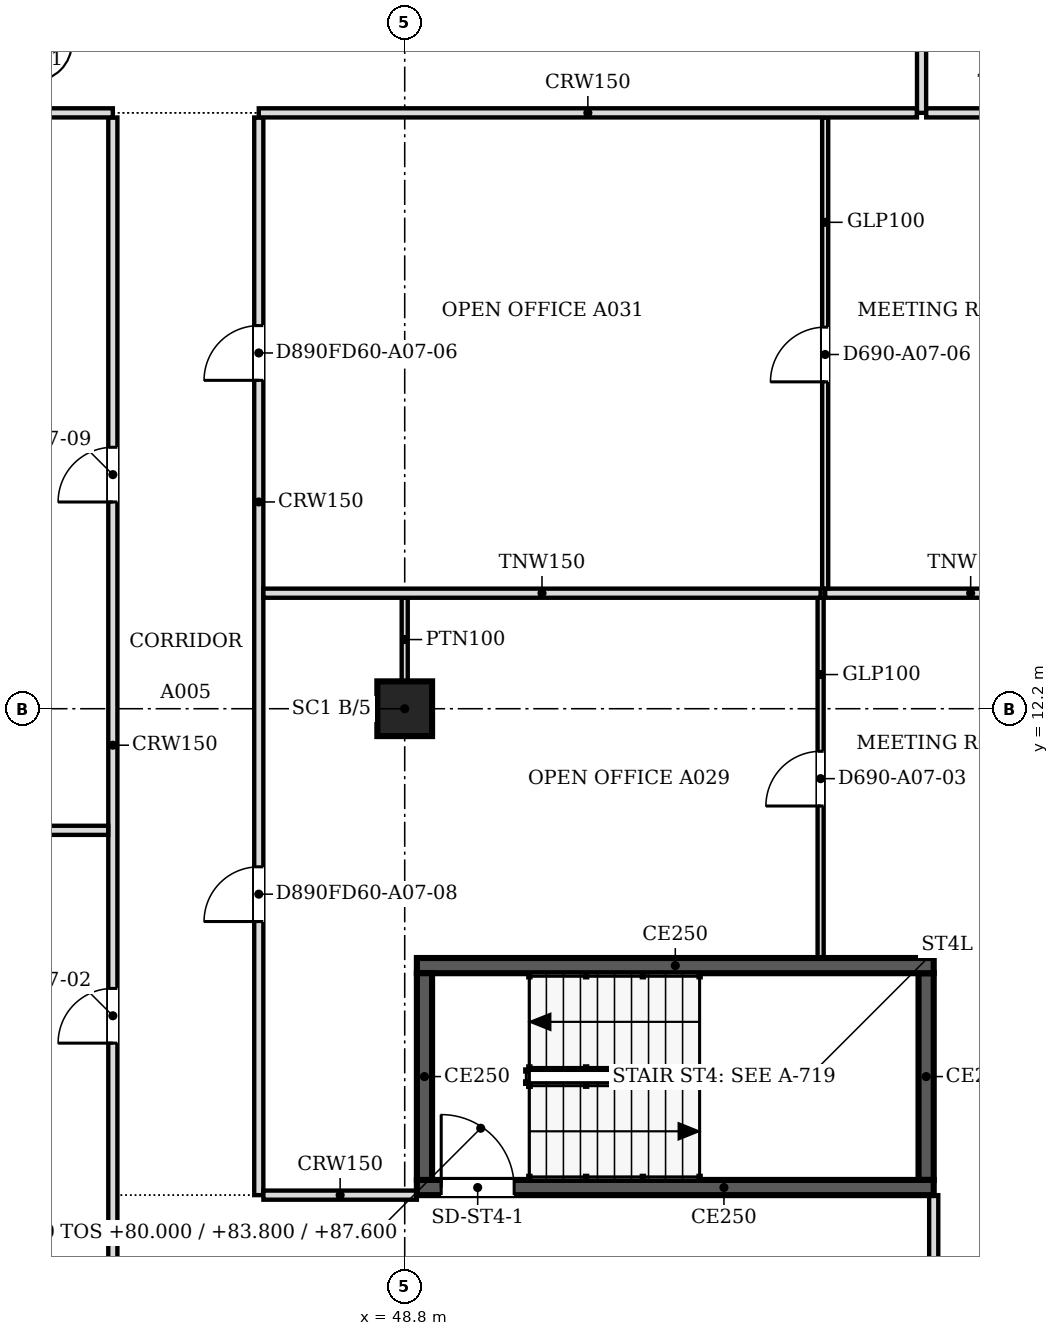
"""IFC4 building model, lengths in metres.
Left out: names, types, materials, properties, quantities, classifications, styles, units other than length and angle.
Written with IfcOpenShell. Run it as: python <this file> out.ifc"""

import sys

from ifc_helpers import new_model, si_unit, direction, frame, frame_2d, origin, origin_2d, place, context, subcontext, project, spatial, polyline, rectangle, outline, extrude, faceted_brep, source, transform, mapped, element, fill, save


model = new_model("IFC4")
c1 = context("Model", 3, precision=1e-05, world=origin(), true_north=direction((0.0, 1.0)))
c2 = subcontext(c1, "Body", "Model", "MODEL_VIEW")
j1 = project(units=[si_unit("LENGTHUNIT", "METRE"), si_unit("PLANEANGLEUNIT", "RADIAN")], contexts=[c1])
p1 = place(None, origin())
s1 = spatial("IfcSite", under=j1, at=p1, CompositionType="ELEMENT")
p2 = place(p1, origin())
s2 = spatial("IfcBuilding", under=s1, at=p2, CompositionType="ELEMENT")
p3 = place(p2, frame((0.0, 0.0, 80.0)))
s3 = spatial("IfcBuildingStorey", under=s2, at=p3, CompositionType="ELEMENT", Elevation=80.0)
p4 = place(p3, frame((48.8, 12.2, 0.0), z_axis=(0.0, 0.0, 1.0), x_axis=(1.0, 0.0, 0.0)))
e1 = element("IfcColumn", 1, at=p4, inside=s3, PredefinedType="COLUMN", context=c2, shape_type="SweptSolid", body=[
    extrude(rectangle(XDim=0.9, YDim=0.9, at=origin_2d()), origin(), (0.0, 0.0, 1.0), 3.6),
])
m1 = source(origin(), c2, "Body", "Brep", [
    faceted_brep([(0.053, -0.25, 0.0), (2.997, -0.25, 3.8), (0.053, -0.25, 7.6), (0.0, -0.25, 7.532), (0.0, -0.25, 0.068), (0.106, 0.25, 7.532), (2.944, 0.25, 3.868), (2.944, 0.25, 3.732), (0.106, 0.25, 0.068), (2.997, 0.0, 3.8), (0.053, 0.0, 0.0), (0.053, 0.0, 7.6)], [[[0, 1, 2, 3, 4]], [[5, 6, 7, 8]], [[8, 7, 9, 1, 0, 10]], [[6, 5, 11, 2, 1, 9]], [[3, 2, 11]], [[10, 0, 4]], [[8, 10, 4, 3, 11, 5]], [[9, 7, 6]]]),
])
p5 = place(p3, frame((57.569, 1.274, -3.8), z_axis=(0.0, 0.0, 1.0), x_axis=(0.707066050402, 0.707147509625, 0.0)))
e2 = element("IfcWall", 2, at=p5, inside=s3, PredefinedType="SOLIDWALL", context=c2, shape_type="MappedRepresentation", body=[
    mapped(m1, transform((0.0, 0.0, 0.0), scale=1.0)),
])
m2 = source(origin(), c2, "Body", "SweptSolid", [
    extrude(outline(polyline([(0.253, 0.666), (2.681, 3.8), (0.253, 6.934), (0.253, 0.666)])), frame((0.0, 0.26, 0.0), z_axis=(0.0, -1.0, 0.0), x_axis=(1.0, 0.0, 0.0)), (0.0, 0.0, 1.0), 0.52),
])
p6 = place(p5, origin())
e3 = element("IfcOpeningElement", 3, at=p6, cuts=e2, PredefinedType="OPENING", context=c2, shape_type="MappedRepresentation", body=[
    mapped(m2, transform((0.0, 0.0, 0.0), scale=1.0)),
])
p7 = place(p2, frame((0.0, 0.0, 83.8)))
s4 = spatial("IfcBuildingStorey", under=s2, at=p7, CompositionType="ELEMENT", Elevation=83.8)
m3 = source(origin(), c2, "Body", "Brep", [
    faceted_brep([(2.944, -0.25, 0.0), (2.997, -0.25, 0.068), (2.997, -0.25, 7.532), (2.944, -0.25, 7.6), (0.0, -0.25, 3.8), (0.053, 0.25, 3.868), (2.891, 0.25, 7.532), (2.891, 0.25, 0.068), (0.053, 0.25, 3.732), (2.944, 0.0, 0.0), (2.944, 0.0, 7.6), (0.0, 0.0, 3.8)], [[[0, 1, 2, 3, 4]], [[5, 6, 7, 8]], [[1, 0, 9]], [[10, 3, 2]], [[6, 5, 11, 4, 3, 10]], [[8, 7, 9, 0, 4, 11]], [[8, 11, 5]], [[1, 9, 7, 6, 10, 2]]]),
])
p8 = place(p7, frame((57.606, 1.312, -3.8), z_axis=(0.0, 0.0, 1.0), x_axis=(0.707147509625, 0.707066050402, 0.0)))
e4 = element("IfcWall", 4, at=p8, inside=s4, PredefinedType="SOLIDWALL", context=c2, shape_type="MappedRepresentation", body=[
    mapped(m3, transform((0.0, 0.0, 0.0), scale=1.0)),
])
m4 = source(origin(), c2, "Body", "SweptSolid", [
    extrude(outline(polyline([(2.744, 6.934), (0.316, 3.8), (2.744, 0.666), (2.744, 6.934)])), frame((0.0, 0.26, 0.0), z_axis=(0.0, -1.0, 0.0), x_axis=(1.0, 0.0, 0.0)), (0.0, 0.0, 1.0), 0.52),
])
p9 = place(p8, origin())
e5 = element("IfcOpeningElement", 5, at=p9, cuts=e4, PredefinedType="OPENING", context=c2, shape_type="MappedRepresentation", body=[
    mapped(m4, transform((0.0, 0.0, 0.0), scale=1.0)),
])
p10 = place(p3, frame((57.5, 4.325, 0.0), z_axis=(0.0, 0.0, 1.0), x_axis=(-1.0, 0.0, 0.0)))
e6 = element("IfcWall", 6, at=p10, inside=s3, PredefinedType="SOLIDWALL", context=c2, shape_type="SweptSolid", body=[
    extrude(rectangle(XDim=8.5, YDim=0.25, at=frame_2d((4.25, 0.0))), origin(), (0.0, 0.0, 1.0), 3.8),
])
m5 = source(origin(), c2, "Body", "SweptSolid", [
    extrude(rectangle(XDim=1.2, YDim=2.1, at=frame_2d((0.6, 1.05))), frame((0.0, 0.135, 0.0), z_axis=(0.0, -1.0, 0.0), x_axis=(1.0, 0.0, 0.0)), (0.0, 0.0, 1.0), 0.27),
])
p11 = place(p10, frame((6.9, 0.0, 0.0)))
e7 = element("IfcOpeningElement", 7, at=p11, cuts=e6, PredefinedType="OPENING", context=c2, shape_type="MappedRepresentation", body=[
    mapped(m5, transform((0.0, 0.0, 0.0), scale=1.0)),
])
p12 = place(p3, frame((49.125, 4.45, 0.0), z_axis=(0.0, 0.0, 1.0), x_axis=(0.0, 1.0, 0.0)))
e8 = element("IfcWall", 8, at=p12, inside=s3, PredefinedType="SOLIDWALL", context=c2, shape_type="SweptSolid", body=[
    extrude(rectangle(XDim=3.4, YDim=0.25, at=frame_2d((1.7, 0.0))), origin(), (0.0, 0.0, 1.0), 3.8),
])
p13 = place(p3, frame((49.0, 7.975, 0.0), z_axis=(0.0, 0.0, 1.0), x_axis=(1.0, 0.0, 0.0)))
e9 = element("IfcWall", 9, at=p13, inside=s3, PredefinedType="SOLIDWALL", context=c2, shape_type="SweptSolid", body=[
    extrude(rectangle(XDim=8.5, YDim=0.25, at=frame_2d((4.25, 0.0))), origin(), (0.0, 0.0, 1.0), 3.8),
])
p14 = place(p3, frame((57.375, 7.85, 0.0), z_axis=(0.0, 0.0, 1.0), x_axis=(0.0, -1.0, 0.0)))
e10 = element("IfcWall", 10, at=p14, inside=s3, PredefinedType="SOLIDWALL", context=c2, shape_type="SweptSolid", body=[
    extrude(rectangle(XDim=3.4, YDim=0.25, at=frame_2d((1.7, 0.0))), origin(), (0.0, 0.0, 1.0), 3.8),
])
p15 = place(p3, frame((44.0, 0.5, 0.0), z_axis=(0.0, 0.0, 1.0), x_axis=(0.0, 1.0, 0.0)))
e11 = element("IfcWall", 11, at=p15, inside=s3, PredefinedType="PARTITIONING", context=c2, shape_type="SweptSolid", body=[
    extrude(rectangle(XDim=21.424, YDim=0.15, at=frame_2d((10.712, 0.0))), origin(), (0.0, 0.0, 1.0), 3.067),
])
m6 = source(origin(), c2, "Body", "SweptSolid", [
    extrude(rectangle(XDim=0.9, YDim=2.1, at=frame_2d((0.45, 1.05))), frame((0.0, 0.085, 0.0), z_axis=(0.0, -1.0, 0.0), x_axis=(1.0, 0.0, 0.0)), (0.0, 0.0, 1.0), 0.17),
])
p16 = place(p15, frame((6.2, 0.0, 0.0)))
e12 = element("IfcOpeningElement", 12, at=p16, cuts=e11, PredefinedType="OPENING", context=c2, shape_type="MappedRepresentation", body=[
    mapped(m6, transform((0.0, 0.0, 0.0), scale=1.0)),
])
p17 = place(p15, frame((15.1, 0.0, 0.0)))
e13 = element("IfcOpeningElement", 13, at=p17, cuts=e11, PredefinedType="OPENING", context=c2, shape_type="MappedRepresentation", body=[
    mapped(m6, transform((0.0, 0.0, 0.0), scale=1.0)),
])
p18 = place(p3, frame((57.5, 1.559, 0.0), z_axis=(0.0, 0.0, 1.0), x_axis=(0.0, 1.0, 0.0)))
e14 = element("IfcWall", 14, at=p18, inside=s3, PredefinedType="PARTITIONING", context=c2, shape_type="SweptSolid", body=[
    extrude(rectangle(XDim=2.641, YDim=0.15, at=frame_2d((1.32, 0.0))), origin(), (0.0, 0.0, 1.0), 3.067),
])
p19 = place(p3, frame((46.4, 21.924, 0.0), z_axis=(0.0, 0.0, 1.0), x_axis=(0.0, -1.0, 0.0)))
e15 = element("IfcWall", 15, at=p19, inside=s3, PredefinedType="PARTITIONING", context=c2, shape_type="SweptSolid", body=[
    extrude(rectangle(XDim=17.724, YDim=0.15, at=frame_2d((8.862, 0.0))), origin(), (0.0, 0.0, 1.0), 3.067),
])
p20 = place(p19, frame((3.423, 0.0, 0.0)))
e16 = element("IfcOpeningElement", 16, at=p20, cuts=e15, PredefinedType="OPENING", context=c2, shape_type="MappedRepresentation", body=[
    mapped(m6, transform((0.0, 0.0, 0.0), scale=1.0)),
])
p21 = place(p19, frame((12.324, 0.0, 0.0)))
e17 = element("IfcOpeningElement", 17, at=p21, cuts=e15, PredefinedType="OPENING", context=c2, shape_type="MappedRepresentation", body=[
    mapped(m6, transform((0.0, 0.0, 0.0), scale=1.0)),
])
p22 = place(p3, frame((46.476, 4.2, 0.0), z_axis=(0.0, 0.0, 1.0), x_axis=(1.0, 0.0, 0.0)))
e18 = element("IfcWall", 18, at=p22, inside=s3, PredefinedType="PARTITIONING", context=c2, shape_type="SweptSolid", body=[
    extrude(rectangle(XDim=2.524, YDim=0.15, at=frame_2d((1.262, 0.0))), origin(), (0.0, 0.0, 1.0), 3.067),
])
p23 = place(p3, frame((55.64, 14.024, 0.0), z_axis=(0.0, 0.0, 1.0), x_axis=(0.0, -1.0, 0.0)))
e19 = element("IfcWall", 19, at=p23, inside=s3, PredefinedType="PARTITIONING", context=c2, shape_type="SweptSolid", body=[
    extrude(rectangle(XDim=5.924, YDim=0.1, at=frame_2d((2.962, 0.0))), origin(), (0.0, 0.0, 1.0), 3.067),
])
m7 = source(origin(), c2, "Body", "SweptSolid", [
    extrude(rectangle(XDim=0.9, YDim=2.1, at=frame_2d((0.45, 1.05))), frame((0.0, 0.06, 0.0), z_axis=(0.0, -1.0, 0.0), x_axis=(1.0, 0.0, 0.0)), (0.0, 0.0, 1.0), 0.12),
])
p24 = place(p23, frame((2.524, 0.0, 0.0)))
e20 = element("IfcOpeningElement", 20, at=p24, cuts=e19, PredefinedType="OPENING", context=c2, shape_type="MappedRepresentation", body=[
    mapped(m7, transform((0.0, 0.0, 0.0), scale=1.0)),
])
p25 = place(p3, frame((27.575, 10.2, 0.0), z_axis=(0.0, 0.0, 1.0), x_axis=(1.0, 0.0, 0.0)))
e21 = element("IfcWall", 21, at=p25, inside=s3, PredefinedType="PARTITIONING", context=c2, shape_type="SweptSolid", body=[
    extrude(rectangle(XDim=16.349, YDim=0.15, at=frame_2d((8.175, 0.0))), origin(), (0.0, 0.0, 1.0), 3.067),
])
p26 = place(p3, frame((48.8, 12.65, 0.0), z_axis=(0.0, 0.0, 1.0), x_axis=(0.0, 1.0, 0.0)))
e22 = element("IfcWall", 22, at=p26, inside=s3, PredefinedType="PARTITIONING", context=c2, shape_type="SweptSolid", body=[
    extrude(rectangle(XDim=1.375, YDim=0.1, at=frame_2d((0.688, 0.0))), origin(), (0.0, 0.0, 1.0), 3.067),
])
p27 = place(p3, frame((46.476, 14.1, 0.0), z_axis=(0.0, 0.0, 1.0), x_axis=(1.0, 0.0, 0.0)))
e23 = element("IfcWall", 23, at=p27, inside=s3, PredefinedType="PARTITIONING", context=c2, shape_type="SweptSolid", body=[
    extrude(rectangle(XDim=9.164, YDim=0.15, at=frame_2d((4.582, 0.0))), origin(), (0.0, 0.0, 1.0), 3.067),
])
p28 = place(p3, frame((55.715, 14.1, 0.0), z_axis=(0.0, 0.0, 1.0), x_axis=(1.0, 0.0, 0.0)))
e24 = element("IfcWall", 24, at=p28, inside=s3, PredefinedType="PARTITIONING", context=c2, shape_type="SweptSolid", body=[
    extrude(rectangle(XDim=4.785, YDim=0.15, at=frame_2d((2.393, 0.0))), origin(), (0.0, 0.0, 1.0), 3.067),
])
p29 = place(p3, frame((55.715, 21.924, 0.0), z_axis=(0.0, 0.0, 1.0), x_axis=(0.0, -1.0, 0.0)))
e25 = element("IfcWall", 25, at=p29, inside=s3, PredefinedType="PARTITIONING", context=c2, shape_type="SweptSolid", body=[
    extrude(rectangle(XDim=7.748, YDim=0.1, at=frame_2d((3.874, 0.0))), origin(), (0.0, 0.0, 1.0), 3.067),
])
p30 = place(p29, frame((3.448, 0.0, 0.0)))
e26 = element("IfcOpeningElement", 26, at=p30, cuts=e25, PredefinedType="OPENING", context=c2, shape_type="MappedRepresentation", body=[
    mapped(m7, transform((0.0, 0.0, 0.0), scale=1.0)),
])
p31 = place(p3, frame((30.5, 22.0, 0.0), z_axis=(0.0, 0.0, 1.0), x_axis=(1.0, 0.0, 0.0)))
e27 = element("IfcWall", 27, at=p31, inside=s3, PredefinedType="PARTITIONING", context=c2, shape_type="SweptSolid", body=[
    extrude(rectangle(XDim=13.5, YDim=0.15, at=frame_2d((6.75, 0.0))), origin(), (0.0, 0.0, 1.0), 3.067),
])
p32 = place(p3, frame((46.4, 22.0, 0.0), z_axis=(0.0, 0.0, 1.0), x_axis=(1.0, 0.0, 0.0)))
e28 = element("IfcWall", 28, at=p32, inside=s3, PredefinedType="PARTITIONING", context=c2, shape_type="SweptSolid", body=[
    extrude(rectangle(XDim=10.824, YDim=0.15, at=frame_2d((5.412, 0.0))), origin(), (0.0, 0.0, 1.0), 3.067),
])
p33 = place(p3, frame((57.3, 30.6, 0.0), z_axis=(0.0, 0.0, 1.0), x_axis=(0.0, -1.0, 0.0)))
e29 = element("IfcWall", 29, at=p33, inside=s3, PredefinedType="PARTITIONING", context=c2, shape_type="SweptSolid", body=[
    extrude(rectangle(XDim=8.6, YDim=0.15, at=frame_2d((4.3, 0.0))), origin(), (0.0, 0.0, 1.0), 3.067),
])
p34 = place(p33, frame((3.9, 0.0, 0.0)))
e30 = element("IfcOpeningElement", 30, at=p34, cuts=e29, PredefinedType="OPENING", context=c2, shape_type="MappedRepresentation", body=[
    mapped(m6, transform((0.0, 0.0, 0.0), scale=1.0)),
])
p35 = place(p3, frame((57.376, 22.0, 0.0), z_axis=(0.0, 0.0, 1.0), x_axis=(1.0, 0.0, 0.0)))
e31 = element("IfcWall", 31, at=p35, inside=s3, PredefinedType="PARTITIONING", context=c2, shape_type="SweptSolid", body=[
    extrude(rectangle(XDim=3.124, YDim=0.15, at=frame_2d((1.562, 0.0))), origin(), (0.0, 0.0, 1.0), 3.067),
])
m8 = source(origin(), c2, "Body", "SweptSolid", [
    extrude(rectangle(XDim=1.2, YDim=2.1, at=frame_2d((0.6, 1.05))), frame((0.0, 0.025, 0.0), z_axis=(0.0, -1.0, 0.0), x_axis=(1.0, 0.0, 0.0)), (0.0, 0.0, 1.0), 0.05),
])
p36 = place(p11, origin())
e32 = element("IfcDoor", 32, at=p36, inside=s3, OperationType="SINGLE_SWING_RIGHT", PredefinedType="DOOR", context=c2, shape_type="MappedRepresentation", body=[
    mapped(m8, transform((0.0, 0.0, 0.0), scale=1.0)),
])
fill(e7, e32)
m9 = source(origin(), c2, "Body", "SweptSolid", [
    extrude(rectangle(XDim=0.9, YDim=2.1, at=frame_2d((0.45, 1.05))), frame((0.0, 0.025, 0.0), z_axis=(0.0, -1.0, 0.0), x_axis=(1.0, 0.0, 0.0)), (0.0, 0.0, 1.0), 0.05),
])
p37 = place(p24, origin())
e33 = element("IfcDoor", 33, at=p37, inside=s3, OperationType="SINGLE_SWING_RIGHT", PredefinedType="DOOR", context=c2, shape_type="MappedRepresentation", body=[
    mapped(m9, transform((0.0, 0.0, 0.0), scale=1.0)),
])
fill(e20, e33)
p38 = place(p16, origin())
e34 = element("IfcDoor", 34, at=p38, inside=s3, OperationType="SINGLE_SWING_LEFT", PredefinedType="DOOR", context=c2, shape_type="MappedRepresentation", body=[
    mapped(m9, transform((0.0, 0.0, 0.0), scale=1.0)),
])
fill(e12, e34)
p39 = place(p30, origin())
e35 = element("IfcDoor", 35, at=p39, inside=s3, OperationType="SINGLE_SWING_RIGHT", PredefinedType="DOOR", context=c2, shape_type="MappedRepresentation", body=[
    mapped(m9, transform((0.0, 0.0, 0.0), scale=1.0)),
])
fill(e26, e35)
p40 = place(p20, origin())
e36 = element("IfcDoor", 36, at=p40, inside=s3, OperationType="SINGLE_SWING_RIGHT", PredefinedType="DOOR", context=c2, shape_type="MappedRepresentation", body=[
    mapped(m9, transform((0.0, 0.0, 0.0), scale=1.0)),
])
fill(e16, e36)
p41 = place(p21, origin())
e37 = element("IfcDoor", 37, at=p41, inside=s3, OperationType="SINGLE_SWING_RIGHT", PredefinedType="DOOR", context=c2, shape_type="MappedRepresentation", body=[
    mapped(m9, transform((0.0, 0.0, 0.0), scale=1.0)),
])
fill(e17, e37)
p42 = place(p17, origin())
e38 = element("IfcDoor", 38, at=p42, inside=s3, OperationType="SINGLE_SWING_LEFT", PredefinedType="DOOR", context=c2, shape_type="MappedRepresentation", body=[
    mapped(m9, transform((0.0, 0.0, 0.0), scale=1.0)),
])
fill(e13, e38)
save(model, sys.argv[1])
